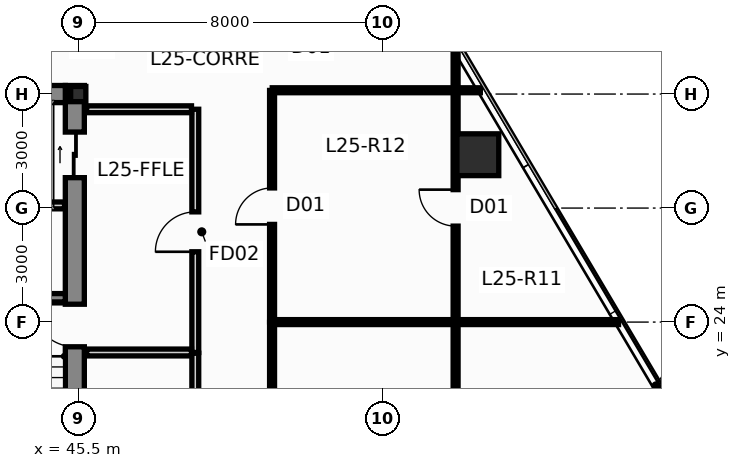
"""IFC4 building model, lengths in metres.
Left out: names, types, materials, properties, quantities, classifications, styles, units other than length and angle.
Written with IfcOpenShell. Run it as: python <this file> out.ifc"""

import sys

from ifc_helpers import new_model, si_unit, direction, frame, frame_2d, origin, origin_2d, place, context, subcontext, project, spatial, rectangle, hollow_rectangle, i_section, extrude, source, transform, mapped, element, fill, save


model = new_model("IFC4")
c1 = context("Model", 3, precision=1e-05, world=origin(), true_north=direction((0.0, 1.0)))
c2 = subcontext(c1, "Body", "Model", "MODEL_VIEW")
j1 = project(units=[si_unit("LENGTHUNIT", "METRE"), si_unit("PLANEANGLEUNIT", "RADIAN")], contexts=[c1])
p1 = place(None, origin())
s1 = spatial("IfcSite", under=j1, at=p1, CompositionType="ELEMENT")
p2 = place(p1, origin())
s2 = spatial("IfcBuilding", under=s1, at=p2, CompositionType="ELEMENT")
p3 = place(p2, frame((0.0, 0.0, 98.1)))
s3 = spatial("IfcBuildingStorey", under=s2, at=p3, CompositionType="ELEMENT", Elevation=98.1)
m1 = source(origin(), c2, "Body", "SweptSolid", [
    extrude(i_section(OverallWidth=0.4, OverallDepth=0.4, WebThickness=0.02, FlangeThickness=0.032, at=origin_2d()), origin(), (0.0, 0.0, 1.0), 3.65),
])
p4 = place(p3, frame((45.5, 30.0, 0.0), z_axis=(0.0, 0.0, 1.0), x_axis=(1.0, 0.0, 0.0)))
e1 = element("IfcColumn", 1, at=p4, inside=s3, PredefinedType="COLUMN", context=c2, shape_type="MappedRepresentation", body=[
    mapped(m1, transform((0.0, 0.0, 0.0), scale=1.0)),
])
p5 = place(p3, frame((45.41, 16.95, 0.0), z_axis=(0.0, 0.0, 1.0), x_axis=(0.0, 1.0, 0.0)))
e2 = element("IfcWall", 2, at=p5, inside=s3, PredefinedType="SHEAR", context=c2, shape_type="SweptSolid", body=[
    extrude(rectangle(XDim=13.275, YDim=0.5, at=frame_2d((6.638, 0.0))), origin(), (0.0, 0.0, 1.0), 3.65),
])
p6 = place(p5, frame((6.4, 0.0, 0.0)))
e3 = element("IfcOpeningElement", 3, at=p6, cuts=e2, PredefinedType="OPENING", context=c2, shape_type="SweptSolid", body=[
    extrude(rectangle(XDim=1.12, YDim=2.15, at=frame_2d((0.56, 1.075))), frame((0.0, 0.262, 0.0), z_axis=(0.0, -1.0, 0.0), x_axis=(1.0, 0.0, 0.0)), (0.0, 0.0, 1.0), 0.524),
])
p7 = place(p5, frame((10.85, 0.0, 0.0)))
e4 = element("IfcOpeningElement", 4, at=p7, cuts=e2, PredefinedType="OPENING", context=c2, shape_type="SweptSolid", body=[
    extrude(rectangle(XDim=1.2, YDim=2.2, at=frame_2d((0.6, 1.1))), frame((0.0, 0.262, 0.0), z_axis=(0.0, -1.0, 0.0), x_axis=(1.0, 0.0, 0.0)), (0.0, 0.0, 1.0), 0.524),
])
p8 = place(p3, frame((42.26, 30.0, 0.0), z_axis=(0.0, 0.0, 1.0), x_axis=(1.0, 0.0, 0.0)))
e5 = element("IfcWall", 5, at=p8, inside=s3, PredefinedType="SHEAR", context=c2, shape_type="SweptSolid", body=[
    extrude(rectangle(XDim=2.9, YDim=0.45, at=frame_2d((1.45, 0.0))), origin(), (0.0, 0.0, 1.0), 3.65),
])
p9 = place(p3, frame((42.26, 24.64, 0.0), z_axis=(0.0, 0.0, 1.0), x_axis=(1.0, 0.0, 0.0)))
e6 = element("IfcWall", 6, at=p9, inside=s3, PredefinedType="SHEAR", context=c2, shape_type="SweptSolid", body=[
    extrude(rectangle(XDim=2.9, YDim=0.22, at=frame_2d((1.45, 0.0))), origin(), (0.0, 0.0, 1.0), 3.65),
])
m2 = source(origin(), c2, "Body", "SweptSolid", [
    extrude(hollow_rectangle(XDim=1.1, YDim=1.1, WallThickness=0.06, at=origin_2d()), origin(), (0.0, 0.0, 1.0), 3.651),
])
p10 = place(p3, frame((56.015, 28.404, 0.0), z_axis=(-0.014913313399, -0.013776424037, 0.999793880369), x_axis=(0.678553674548, -0.734550822447, 0.0)))
e7 = element("IfcColumn", 7, at=p10, inside=s3, PredefinedType="COLUMN", context=c2, shape_type="MappedRepresentation", body=[
    mapped(m2, transform((0.0, 0.0, 0.0), scale=1.0)),
])
p11 = place(p3, frame((48.58, 23.2, 0.0), z_axis=(0.0, 0.0, 1.0), x_axis=(0.0, 1.0, 0.0)))
e8 = element("IfcWall", 8, at=p11, inside=s3, PredefinedType="PARTITIONING", context=c2, shape_type="SweptSolid", body=[
    extrude(rectangle(XDim=6.4, YDim=0.18, at=frame_2d((3.2, 0.0))), origin(), (0.0, 0.0, 1.0), 3.026),
])
p12 = place(p11, frame((2.65, 0.0, 0.0)))
e9 = element("IfcOpeningElement", 9, at=p12, cuts=e8, PredefinedType="OPENING", context=c2, shape_type="SweptSolid", body=[
    extrude(rectangle(XDim=1.05, YDim=2.15, at=frame_2d((0.525, 1.075))), frame((0.0, 0.102, 0.0), z_axis=(0.0, -1.0, 0.0), x_axis=(1.0, 0.0, 0.0)), (0.0, 0.0, 1.0), 0.204),
])
p13 = place(p3, frame((45.72, 23.2, 0.0), z_axis=(0.0, 0.0, 1.0), x_axis=(1.0, 0.0, 0.0)))
e10 = element("IfcWall", 10, at=p13, inside=s3, PredefinedType="PARTITIONING", context=c2, shape_type="SweptSolid", body=[
    extrude(rectangle(XDim=2.76, YDim=0.18, at=frame_2d((1.38, 0.0))), origin(), (0.0, 0.0, 1.0), 3.4),
])
p14 = place(p3, frame((45.72, 29.6, 0.0), z_axis=(0.0, 0.0, 1.0), x_axis=(1.0, 0.0, 0.0)))
e11 = element("IfcWall", 11, at=p14, inside=s3, PredefinedType="PARTITIONING", context=c2, shape_type="SweptSolid", body=[
    extrude(rectangle(XDim=2.76, YDim=0.18, at=frame_2d((1.38, 0.0))), origin(), (0.0, 0.0, 1.0), 2.783),
])
p15 = place(p3, frame((42.24, 27.07, 0.0), z_axis=(0.0, 0.0, 1.0), x_axis=(1.0, 0.0, 0.0)))
e12 = element("IfcWall", 12, at=p15, inside=s3, PredefinedType="PARTITIONING", context=c2, shape_type="SweptSolid", body=[
    extrude(rectangle(XDim=2.9, YDim=0.18, at=frame_2d((1.45, 0.0))), origin(), (0.0, 0.0, 1.0), 3.4),
])
p16 = place(p3, frame((48.58, 17.15, 0.0), z_axis=(0.0, 0.0, 1.0), x_axis=(0.0, 1.0, 0.0)))
e13 = element("IfcWall", 13, at=p16, inside=s3, PredefinedType="PARTITIONING", context=c2, shape_type="SweptSolid", body=[
    extrude(rectangle(XDim=6.03, YDim=0.18, at=frame_2d((3.015, 0.0))), origin(), (0.0, 0.0, 1.0), 3.4),
])
p17 = place(p16, frame((2.45, 0.0, 0.0)))
e14 = element("IfcOpeningElement", 14, at=p17, cuts=e13, PredefinedType="OPENING", context=c2, shape_type="SweptSolid", body=[
    extrude(rectangle(XDim=1.05, YDim=2.15, at=frame_2d((0.525, 1.075))), frame((0.0, 0.102, 0.0), z_axis=(0.0, -1.0, 0.0), x_axis=(1.0, 0.0, 0.0)), (0.0, 0.0, 1.0), 0.204),
])
p18 = place(p3, frame((50.6, 17.105, 0.0), z_axis=(0.0, 0.0, 1.0), x_axis=(0.0, 1.0, 0.0)))
e15 = element("IfcWall", 15, at=p18, inside=s3, PredefinedType="PARTITIONING", context=c2, shape_type="SweptSolid", body=[
    extrude(rectangle(XDim=6.89, YDim=0.13, at=frame_2d((3.445, 0.0))), origin(), (0.0, 0.0, 1.0), 3.026),
])
p19 = place(p18, frame((2.965, 0.0, 0.0)))
e16 = element("IfcOpeningElement", 16, at=p19, cuts=e15, PredefinedType="OPENING", context=c2, shape_type="SweptSolid", body=[
    extrude(rectangle(XDim=0.96, YDim=2.15, at=frame_2d((0.48, 1.075))), frame((0.0, 0.077, 0.0), z_axis=(0.0, -1.0, 0.0), x_axis=(1.0, 0.0, 0.0)), (0.0, 0.0, 1.0), 0.154),
])
p20 = place(p3, frame((55.43, 17.105, 0.0), z_axis=(0.0, 0.0, 1.0), x_axis=(0.0, 1.0, 0.0)))
e17 = element("IfcWall", 17, at=p20, inside=s3, PredefinedType="PARTITIONING", context=c2, shape_type="SweptSolid", body=[
    extrude(rectangle(XDim=6.89, YDim=0.13, at=frame_2d((3.445, 0.0))), origin(), (0.0, 0.0, 1.0), 3.026),
])
p21 = place(p3, frame((50.6, 24.005, 0.0), z_axis=(0.0, 0.0, 1.0), x_axis=(0.0, 1.0, 0.0)))
e18 = element("IfcWall", 18, at=p21, inside=s3, PredefinedType="PARTITIONING", context=c2, shape_type="SweptSolid", body=[
    extrude(rectangle(XDim=6.09, YDim=0.13, at=frame_2d((3.045, 0.0))), origin(), (0.0, 0.0, 1.0), 3.026),
])
p22 = place(p21, frame((2.565, 0.0, 0.0)))
e19 = element("IfcOpeningElement", 19, at=p22, cuts=e18, PredefinedType="OPENING", context=c2, shape_type="SweptSolid", body=[
    extrude(rectangle(XDim=0.96, YDim=2.15, at=frame_2d((0.48, 1.075))), frame((0.0, 0.077, 0.0), z_axis=(0.0, -1.0, 0.0), x_axis=(1.0, 0.0, 0.0)), (0.0, 0.0, 1.0), 0.154),
])
p23 = place(p3, frame((55.43, 24.005, 0.0), z_axis=(0.0, 0.0, 1.0), x_axis=(0.0, 1.0, 0.0)))
e20 = element("IfcWall", 20, at=p23, inside=s3, PredefinedType="PARTITIONING", context=c2, shape_type="SweptSolid", body=[
    extrude(rectangle(XDim=7.208, YDim=0.13, at=frame_2d((3.604, 0.0))), origin(), (0.0, 0.0, 1.0), 3.4),
])
p24 = place(p23, frame((2.52, 0.0, 0.0)))
e21 = element("IfcOpeningElement", 21, at=p24, cuts=e20, PredefinedType="OPENING", context=c2, shape_type="SweptSolid", body=[
    extrude(rectangle(XDim=0.96, YDim=2.15, at=frame_2d((0.48, 1.075))), frame((0.0, 0.077, 0.0), z_axis=(0.0, -1.0, 0.0), x_axis=(1.0, 0.0, 0.0)), (0.0, 0.0, 1.0), 0.154),
])
p25 = place(p3, frame((50.605, 30.1, 0.0), z_axis=(0.0, 0.0, 1.0), x_axis=(1.0, 0.0, 0.0)))
e22 = element("IfcWall", 22, at=p25, inside=s3, PredefinedType="PARTITIONING", context=c2, shape_type="SweptSolid", body=[
    extrude(rectangle(XDim=5.476, YDim=0.13, at=frame_2d((2.738, 0.0))), origin(), (0.0, 0.0, 1.0), 3.4),
])
p26 = place(p3, frame((50.605, 24.0, 0.0), z_axis=(0.0, 0.0, 1.0), x_axis=(1.0, 0.0, 0.0)))
e23 = element("IfcWall", 23, at=p26, inside=s3, PredefinedType="PARTITIONING", context=c2, shape_type="SweptSolid", body=[
    extrude(rectangle(XDim=4.82, YDim=0.13, at=frame_2d((2.41, 0.0))), origin(), (0.0, 0.0, 1.0), 3.4),
])
p27 = place(p3, frame((55.435, 24.0, 0.0), z_axis=(0.0, 0.0, 1.0), x_axis=(1.0, 0.0, 0.0)))
e24 = element("IfcWall", 24, at=p27, inside=s3, PredefinedType="PARTITIONING", context=c2, shape_type="SweptSolid", body=[
    extrude(rectangle(XDim=4.282, YDim=0.13, at=frame_2d((2.141, 0.0))), origin(), (0.0, 0.0, 1.0), 3.4),
])
p28 = place(p6, origin())
e25 = element("IfcDoor", 25, at=p28, inside=s3, OperationType="SINGLE_SWING_RIGHT", PredefinedType="DOOR", context=c2, shape_type="SweptSolid", body=[
    extrude(rectangle(XDim=1.12, YDim=2.15, at=frame_2d((0.56, 1.075))), frame((0.0, 0.025, 0.0), z_axis=(0.0, -1.0, 0.0), x_axis=(1.0, 0.0, 0.0)), (0.0, 0.0, 1.0), 0.05),
])
fill(e3, e25)
p29 = place(p7, origin())
e26 = element("IfcDoor", 26, at=p29, inside=s3, OperationType="SLIDING_TO_RIGHT", PredefinedType="DOOR", context=c2, shape_type="SweptSolid", body=[
    extrude(rectangle(XDim=1.2, YDim=2.2, at=frame_2d((0.6, 1.1))), frame((0.0, 0.025, 0.0), z_axis=(0.0, -1.0, 0.0), x_axis=(1.0, 0.0, 0.0)), (0.0, 0.0, 1.0), 0.05),
])
fill(e4, e26)
p30 = place(p12, origin())
e27 = element("IfcDoor", 27, at=p30, inside=s3, OperationType="SINGLE_SWING_LEFT", PredefinedType="DOOR", context=c2, shape_type="SweptSolid", body=[
    extrude(rectangle(XDim=1.05, YDim=2.15, at=frame_2d((0.525, 1.075))), frame((0.0, 0.025, 0.0), z_axis=(0.0, -1.0, 0.0), x_axis=(1.0, 0.0, 0.0)), (0.0, 0.0, 1.0), 0.05),
])
fill(e9, e27)
p31 = place(p22, origin())
e28 = element("IfcDoor", 28, at=p31, inside=s3, OperationType="SINGLE_SWING_LEFT", PredefinedType="DOOR", context=c2, shape_type="SweptSolid", body=[
    extrude(rectangle(XDim=0.96, YDim=2.15, at=frame_2d((0.48, 1.075))), frame((0.0, 0.025, 0.0), z_axis=(0.0, -1.0, 0.0), x_axis=(1.0, 0.0, 0.0)), (0.0, 0.0, 1.0), 0.05),
])
fill(e19, e28)
p32 = place(p24, origin())
e29 = element("IfcDoor", 29, at=p32, inside=s3, OperationType="SINGLE_SWING_RIGHT", PredefinedType="DOOR", context=c2, shape_type="SweptSolid", body=[
    extrude(rectangle(XDim=0.96, YDim=2.15, at=frame_2d((0.48, 1.075))), frame((0.0, 0.025, 0.0), z_axis=(0.0, -1.0, 0.0), x_axis=(1.0, 0.0, 0.0)), (0.0, 0.0, 1.0), 0.05),
])
fill(e21, e29)
save(model, sys.argv[1])
